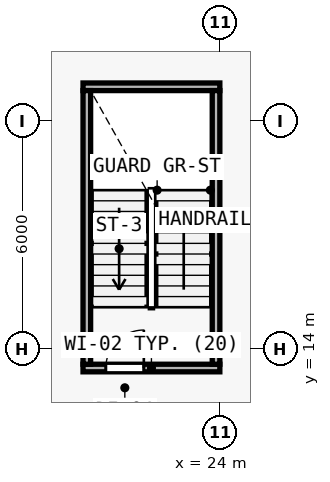
"""IFC4 building model, lengths in metres.
Left out: names, types, materials, properties, quantities, classifications, styles, units other than length and angle.
Written with IfcOpenShell. Run it as: python <this file> out.ifc"""

import sys

from ifc_helpers import new_model, si_unit, direction, frame, frame_2d, origin, place, context, subcontext, project, spatial, rectangle, extrude, element, fill, save


model = new_model("IFC4")
c1 = context("Model", 3, precision=1e-05, world=origin(), true_north=direction((0.0, 1.0)))
c2 = subcontext(c1, "Body", "Model", "MODEL_VIEW")
j1 = project(units=[si_unit("LENGTHUNIT", "METRE"), si_unit("PLANEANGLEUNIT", "RADIAN")], contexts=[c1])
p1 = place(None, origin())
s1 = spatial("IfcSite", under=j1, at=p1, CompositionType="ELEMENT")
p2 = place(p1, origin())
s2 = spatial("IfcBuilding", under=s1, at=p2, CompositionType="ELEMENT")
p3 = place(p2, frame((0.0, 0.0, 17.6)))
s3 = spatial("IfcBuildingStorey", under=s2, at=p3, CompositionType="ELEMENT", Elevation=17.6)
p4 = place(p3, frame((20.4, 13.5, 0.0), z_axis=(0.0, 0.0, 1.0), x_axis=(1.0, 0.0, 0.0)))
e1 = element("IfcWall", 1, at=p4, inside=s3, PredefinedType="SOLIDWALL", context=c2, shape_type="SweptSolid", body=[
    extrude(rectangle(XDim=3.6, YDim=0.2, at=frame_2d((1.8, 0.0))), origin(), (0.0, 0.0, 1.0), 3.88),
])
p5 = place(p4, frame((0.6, 0.0, 0.0)))
e2 = element("IfcOpeningElement", 2, at=p5, cuts=e1, PredefinedType="OPENING", context=c2, shape_type="SweptSolid", body=[
    extrude(rectangle(XDim=1.0, YDim=2.15, at=frame_2d((0.5, 1.075))), frame((0.0, 0.11, 0.0), z_axis=(0.0, -1.0, 0.0), x_axis=(1.0, 0.0, 0.0)), (0.0, 0.0, 1.0), 0.22),
])
p6 = place(p3, frame((20.4, 20.9, 0.0), z_axis=(0.0, 0.0, 1.0), x_axis=(1.0, 0.0, 0.0)))
e3 = element("IfcWall", 3, at=p6, inside=s3, PredefinedType="SOLIDWALL", context=c2, shape_type="SweptSolid", body=[
    extrude(rectangle(XDim=3.6, YDim=0.2, at=frame_2d((1.8, 0.0))), origin(), (0.0, 0.0, 1.0), 3.88),
])
for number, where, z_axis, x_axis in (
    (4, (20.5, 13.6, 0.0), (0.0, 0.0, 1.0), (0.0, 1.0, 0.0)),
    (5, (23.9, 13.6, 0.0), (0.0, 0.0, 1.0), (0.0, 1.0, 0.0)),
):
    element("IfcWall", number, at=place(p3, frame(where, z_axis=z_axis, x_axis=x_axis)), inside=s3, PredefinedType="SOLIDWALL", context=c2, shape_type="SweptSolid", body=[
        extrude(rectangle(XDim=7.2, YDim=0.2, at=frame_2d((3.6, 0.0))), origin(), (0.0, 0.0, 1.0), 3.88),
    ])
p7 = place(p5, origin())
e6 = element("IfcDoor", 6, at=p7, inside=s3, OperationType="SINGLE_SWING_RIGHT", PredefinedType="DOOR", context=c2, shape_type="SweptSolid", body=[
    extrude(rectangle(XDim=1.0, YDim=2.15, at=frame_2d((0.5, 1.075))), frame((0.0, 0.025, 0.0), z_axis=(0.0, -1.0, 0.0), x_axis=(1.0, 0.0, 0.0)), (0.0, 0.0, 1.0), 0.05),
])
fill(e2, e6)
save(model, sys.argv[1])
